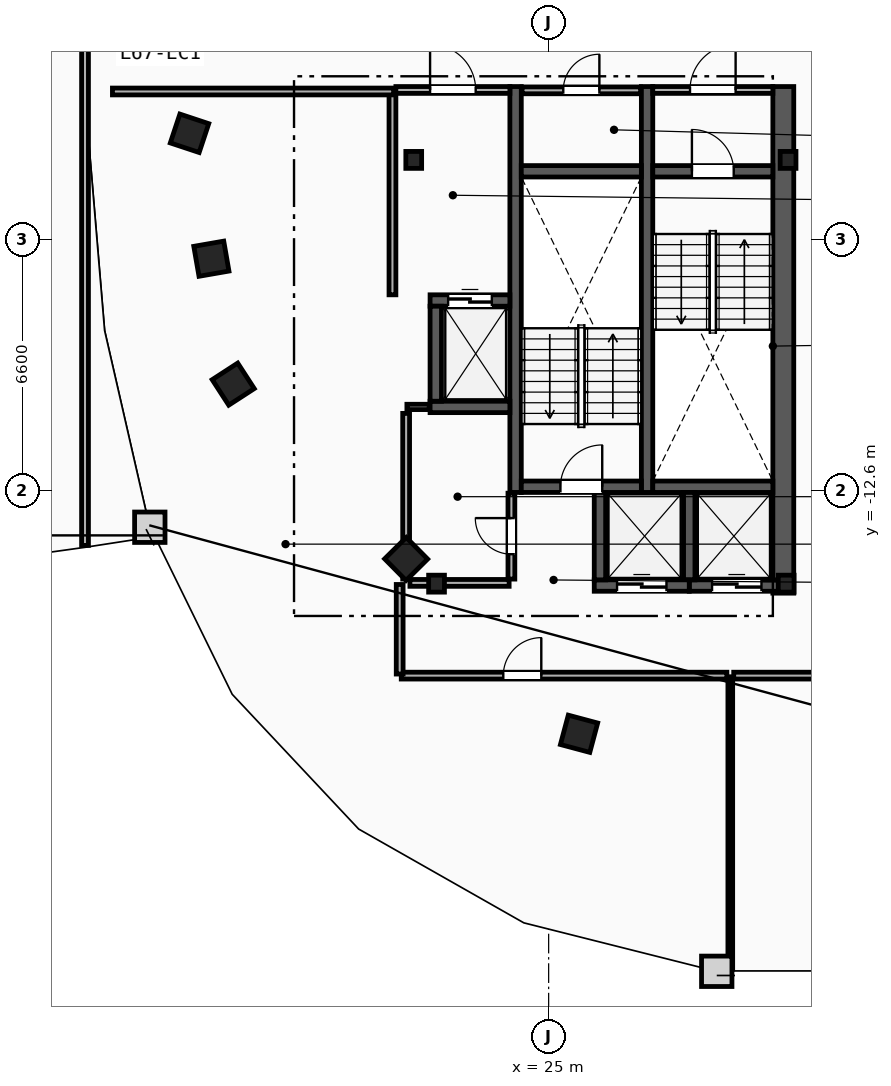
"""IFC4 building model, lengths in metres.
Left out: names, types, materials, properties, quantities, classifications, styles, units other than length and angle.
Written with IfcOpenShell. Run it as: python <this file> out.ifc"""

import sys

from ifc_helpers import new_model, si_unit, direction, frame, frame_2d, origin, origin_2d, place, context, subcontext, project, spatial, rectangle, i_section, extrude, element, fill, save


model = new_model("IFC4")
c1 = context("Model", 3, precision=1e-05, world=origin(), true_north=direction((0.0, 1.0)))
c2 = subcontext(c1, "Body", "Model", "MODEL_VIEW")
j1 = project(units=[si_unit("LENGTHUNIT", "METRE"), si_unit("PLANEANGLEUNIT", "RADIAN")], contexts=[c1])
p1 = place(None, origin())
s1 = spatial("IfcSite", under=j1, at=p1, CompositionType="ELEMENT")
p2 = place(p1, origin())
s2 = spatial("IfcBuilding", under=s1, at=p2, CompositionType="ELEMENT")
p3 = place(p2, frame((0.0, 0.0, 254.0)))
s3 = spatial("IfcBuildingStorey", under=s2, at=p3, CompositionType="ELEMENT", Elevation=254.0)
for number, where, z_axis, x_axis in (
    (1, (31.3, -3.9, 0.0), (0.0, 0.0, 1.0), (1.0, 0.0, 0.0)),
    (2, (21.45, -3.9, 0.0), (0.0, 0.0, 1.0), (1.0, 0.0, 0.0)),
    (3, (22.05, -15.05, 0.0), (0.0, 0.0, 1.0), (1.0, 0.0, 0.0)),
    (4, (31.25, -15.05, 0.0), (0.0, 0.0, 1.0), (1.0, 0.0, 0.0)),
):
    element("IfcColumn", number, at=place(p3, frame(where, z_axis=z_axis, x_axis=x_axis)), inside=s3, PredefinedType="COLUMN", context=c2, shape_type="SweptSolid", body=[
        extrude(i_section(OverallWidth=0.416, OverallDepth=0.446, WebThickness=0.039, FlangeThickness=0.063, FilletRadius=0.018, at=origin_2d()), origin(), (0.0, 0.0, 1.0), 3.6),
    ])
for number, where, z_axis, x_axis in (
    (5, (15.55, -3.2, 0.0), (0.0, 0.0, 1.0), (-0.315, -0.949, 0.0)),
    (6, (16.125, -6.5, 0.0), (0.0, 0.0, 1.0), (0.172, -0.985, 0.0)),
    (7, (16.7, -9.8, 0.0), (0.0, 0.0, 1.0), (0.544, -0.839, 0.0)),
    (8, (21.25, -14.4, 0.0), (0.0, 0.0, 1.0), (0.703, -0.711, 0.0)),
    (9, (25.8, -19.0, 0.0), (0.0, 0.0, 1.0), (0.966, -0.259, 0.0)),
):
    element("IfcColumn", number, at=place(p3, frame(where, z_axis=z_axis, x_axis=x_axis)), inside=s3, PredefinedType="COLUMN", context=c2, shape_type="SweptSolid", body=[
        extrude(rectangle(XDim=0.8, YDim=0.8, at=origin_2d()), origin(), (0.0, 0.0, 1.0), 3.6),
    ])
p4 = place(p3, frame((31.175, -15.3, 0.0), z_axis=(0.0, 0.0, 1.0), x_axis=(0.0, 1.0, 0.0)))
e10 = element("IfcWall", 10, at=p4, inside=s3, PredefinedType="SHEAR", context=c2, shape_type="SweptSolid", body=[
    extrude(rectangle(XDim=13.33, YDim=0.55, at=frame_2d((6.665, 0.0))), origin(), (0.0, 0.0, 1.0), 3.34),
])
for number, where, z_axis, x_axis in (
    (11, (27.59, -12.65, 0.0), (0.0, 0.0, 1.0), (0.0, 1.0, 0.0)),
    (12, (24.13, -12.65, 0.0), (0.0, 0.0, 1.0), (0.0, 1.0, 0.0)),
):
    element("IfcWall", number, at=place(p3, frame(where, z_axis=z_axis, x_axis=x_axis)), inside=s3, PredefinedType="SHEAR", context=c2, shape_type="SweptSolid", body=[
        extrude(rectangle(XDim=10.68, YDim=0.3, at=frame_2d((5.34, 0.0))), origin(), (0.0, 0.0, 1.0), 3.34),
    ])
p5 = place(p3, frame((27.74, -4.2, 0.0), z_axis=(0.0, 0.0, 1.0), x_axis=(1.0, 0.0, 0.0)))
e13 = element("IfcWall", 13, at=p5, inside=s3, PredefinedType="SHEAR", context=c2, shape_type="SweptSolid", body=[
    extrude(rectangle(XDim=3.16, YDim=0.3, at=frame_2d((1.58, 0.0))), origin(), (0.0, 0.0, 1.0), 3.34),
])
p6 = place(p5, frame((1.03, 0.0, 0.0)))
e14 = element("IfcOpeningElement", 14, at=p6, cuts=e13, PredefinedType="OPENING", context=c2, shape_type="SweptSolid", body=[
    extrude(rectangle(XDim=1.1, YDim=2.15, at=frame_2d((0.55, 1.075))), frame((0.0, 0.16, 0.0), z_axis=(0.0, -1.0, 0.0), x_axis=(1.0, 0.0, 0.0)), (0.0, 0.0, 1.0), 0.32),
])
p7 = place(p3, frame((27.74, -12.5, 0.0), z_axis=(0.0, 0.0, 1.0), x_axis=(1.0, 0.0, 0.0)))
e15 = element("IfcWall", 15, at=p7, inside=s3, PredefinedType="SHEAR", context=c2, shape_type="SweptSolid", body=[
    extrude(rectangle(XDim=3.16, YDim=0.3, at=frame_2d((1.58, 0.0))), origin(), (0.0, 0.0, 1.0), 3.34),
])
p8 = place(p3, frame((24.28, -12.5, 0.0), z_axis=(0.0, 0.0, 1.0), x_axis=(1.0, 0.0, 0.0)))
e16 = element("IfcWall", 16, at=p8, inside=s3, PredefinedType="SHEAR", context=c2, shape_type="SweptSolid", body=[
    extrude(rectangle(XDim=3.16, YDim=0.3, at=frame_2d((1.58, 0.0))), origin(), (0.0, 0.0, 1.0), 3.34),
])
p9 = place(p8, frame((1.03, 0.0, 0.0)))
e17 = element("IfcOpeningElement", 17, at=p9, cuts=e16, PredefinedType="OPENING", context=c2, shape_type="SweptSolid", body=[
    extrude(rectangle(XDim=1.1, YDim=2.15, at=frame_2d((0.55, 1.075))), frame((0.0, 0.16, 0.0), z_axis=(0.0, -1.0, 0.0), x_axis=(1.0, 0.0, 0.0)), (0.0, 0.0, 1.0), 0.32),
])
p10 = place(p3, frame((24.28, -4.2, 0.0), z_axis=(0.0, 0.0, 1.0), x_axis=(1.0, 0.0, 0.0)))
e18 = element("IfcWall", 18, at=p10, inside=s3, PredefinedType="SHEAR", context=c2, shape_type="SweptSolid", body=[
    extrude(rectangle(XDim=3.16, YDim=0.3, at=frame_2d((1.58, 0.0))), origin(), (0.0, 0.0, 1.0), 3.34),
])
p11 = place(p3, frame((20.89, -7.45, 0.0), z_axis=(0.0, 0.0, 1.0), x_axis=(0.0, 1.0, 0.0)))
e19 = element("IfcWall", 19, at=p11, inside=s3, PredefinedType="PARTITIONING", context=c2, shape_type="SweptSolid", body=[
    extrude(rectangle(XDim=5.3, YDim=0.18, at=frame_2d((2.65, 0.0))), origin(), (0.0, 0.0, 1.0), 3.34),
])
p12 = place(p3, frame((20.98, -2.06, 0.0), z_axis=(0.0, 0.0, 1.0), x_axis=(1.0, 0.0, 0.0)))
e20 = element("IfcWall", 20, at=p12, inside=s3, PredefinedType="PARTITIONING", context=c2, shape_type="SweptSolid", body=[
    extrude(rectangle(XDim=3.0, YDim=0.18, at=frame_2d((1.5, 0.0))), origin(), (0.0, 0.0, 1.0), 3.34),
])
p13 = place(p12, frame((0.9, 0.0, 0.0)))
e21 = element("IfcOpeningElement", 21, at=p13, cuts=e20, PredefinedType="OPENING", context=c2, shape_type="SweptSolid", body=[
    extrude(rectangle(XDim=1.2, YDim=2.15, at=frame_2d((0.6, 1.075))), frame((0.0, 0.1, 0.0), z_axis=(0.0, -1.0, 0.0), x_axis=(1.0, 0.0, 0.0)), (0.0, 0.0, 1.0), 0.2),
])
p14 = place(p3, frame((27.74, -2.06, 0.0), z_axis=(0.0, 0.0, 1.0), x_axis=(1.0, 0.0, 0.0)))
e22 = element("IfcWall", 22, at=p14, inside=s3, PredefinedType="PARTITIONING", context=c2, shape_type="SweptSolid", body=[
    extrude(rectangle(XDim=3.16, YDim=0.18, at=frame_2d((1.58, 0.0))), origin(), (0.0, 0.0, 1.0), 3.34),
])
p15 = place(p14, frame((0.98, 0.0, 0.0)))
e23 = element("IfcOpeningElement", 23, at=p15, cuts=e22, PredefinedType="OPENING", context=c2, shape_type="SweptSolid", body=[
    extrude(rectangle(XDim=1.2, YDim=2.15, at=frame_2d((0.6, 1.075))), frame((0.0, 0.1, 0.0), z_axis=(0.0, -1.0, 0.0), x_axis=(1.0, 0.0, 0.0)), (0.0, 0.0, 1.0), 0.2),
])
p16 = place(p3, frame((21.88, -7.6, 0.0), z_axis=(0.0, 0.0, 1.0), x_axis=(1.0, 0.0, 0.0)))
e24 = element("IfcWall", 24, at=p16, inside=s3, PredefinedType="SHEAR", context=c2, shape_type="SweptSolid", body=[
    extrude(rectangle(XDim=2.1, YDim=0.3, at=frame_2d((1.05, 0.0))), origin(), (0.0, 0.0, 1.0), 3.34),
])
p17 = place(p16, frame((0.475, 0.0, 0.0)))
e25 = element("IfcOpeningElement", 25, at=p17, cuts=e24, PredefinedType="OPENING", context=c2, shape_type="SweptSolid", body=[
    extrude(rectangle(XDim=1.15, YDim=2.2, at=frame_2d((0.575, 1.1))), frame((0.0, 0.16, 0.0), z_axis=(0.0, -1.0, 0.0), x_axis=(1.0, 0.0, 0.0)), (0.0, 0.0, 1.0), 0.32),
])
p18 = place(p3, frame((21.88, -10.4, 0.0), z_axis=(0.0, 0.0, 1.0), x_axis=(1.0, 0.0, 0.0)))
e26 = element("IfcWall", 26, at=p18, inside=s3, PredefinedType="SHEAR", context=c2, shape_type="SweptSolid", body=[
    extrude(rectangle(XDim=2.1, YDim=0.3, at=frame_2d((1.05, 0.0))), origin(), (0.0, 0.0, 1.0), 3.34),
])
p19 = place(p3, frame((22.03, -10.25, 0.0), z_axis=(0.0, 0.0, 1.0), x_axis=(0.0, 1.0, 0.0)))
e27 = element("IfcWall", 27, at=p19, inside=s3, PredefinedType="SHEAR", context=c2, shape_type="SweptSolid", body=[
    extrude(rectangle(XDim=2.5, YDim=0.3, at=frame_2d((1.25, 0.0))), origin(), (0.0, 0.0, 1.0), 3.34),
])
p20 = place(p3, frame((28.7, -15.1, 0.0), z_axis=(0.0, 0.0, 1.0), x_axis=(1.0, 0.0, 0.0)))
e28 = element("IfcWall", 28, at=p20, inside=s3, PredefinedType="SHEAR", context=c2, shape_type="SweptSolid", body=[
    extrude(rectangle(XDim=2.5, YDim=0.3, at=frame_2d((1.25, 0.0))), origin(), (0.0, 0.0, 1.0), 3.34),
])
p21 = place(p20, frame((0.6, 0.0, 0.0)))
e29 = element("IfcOpeningElement", 29, at=p21, cuts=e28, PredefinedType="OPENING", context=c2, shape_type="SweptSolid", body=[
    extrude(rectangle(XDim=1.3, YDim=2.2, at=frame_2d((0.65, 1.1))), frame((0.0, 0.16, 0.0), z_axis=(0.0, -1.0, 0.0), x_axis=(1.0, 0.0, 0.0)), (0.0, 0.0, 1.0), 0.32),
])
p22 = place(p3, frame((28.7, -14.95, 0.0), z_axis=(0.0, 0.0, 1.0), x_axis=(0.0, 1.0, 0.0)))
e30 = element("IfcWall", 30, at=p22, inside=s3, PredefinedType="SHEAR", context=c2, shape_type="SweptSolid", body=[
    extrude(rectangle(XDim=2.3, YDim=0.3, at=frame_2d((1.15, 0.0))), origin(), (0.0, 0.0, 1.0), 3.34),
])
p23 = place(p3, frame((26.2, -15.1, 0.0), z_axis=(0.0, 0.0, 1.0), x_axis=(1.0, 0.0, 0.0)))
e31 = element("IfcWall", 31, at=p23, inside=s3, PredefinedType="SHEAR", context=c2, shape_type="SweptSolid", body=[
    extrude(rectangle(XDim=2.5, YDim=0.3, at=frame_2d((1.25, 0.0))), origin(), (0.0, 0.0, 1.0), 3.34),
])
p24 = place(p23, frame((0.6, 0.0, 0.0)))
e32 = element("IfcOpeningElement", 32, at=p24, cuts=e31, PredefinedType="OPENING", context=c2, shape_type="SweptSolid", body=[
    extrude(rectangle(XDim=1.3, YDim=2.2, at=frame_2d((0.65, 1.1))), frame((0.0, 0.16, 0.0), z_axis=(0.0, -1.0, 0.0), x_axis=(1.0, 0.0, 0.0)), (0.0, 0.0, 1.0), 0.32),
])
p25 = place(p3, frame((26.35, -14.95, 0.0), z_axis=(0.0, 0.0, 1.0), x_axis=(0.0, 1.0, 0.0)))
e33 = element("IfcWall", 33, at=p25, inside=s3, PredefinedType="SHEAR", context=c2, shape_type="SweptSolid", body=[
    extrude(rectangle(XDim=2.3, YDim=0.3, at=frame_2d((1.15, 0.0))), origin(), (0.0, 0.0, 1.0), 3.34),
])
p26 = place(p3, frame((21.27, -10.4, 0.0), z_axis=(0.0, 0.0, 1.0), x_axis=(1.0, 0.0, 0.0)))
e34 = element("IfcWall", 34, at=p26, inside=s3, PredefinedType="PARTITIONING", context=c2, shape_type="SweptSolid", body=[
    extrude(rectangle(XDim=0.59, YDim=0.14, at=frame_2d((0.295, 0.0))), origin(), (0.0, 0.0, 1.0), 3.34),
])
p27 = place(p3, frame((21.25, -14.93, 0.0), z_axis=(0.0, 0.0, 1.0), x_axis=(0.0, 1.0, 0.0)))
e35 = element("IfcWall", 35, at=p27, inside=s3, PredefinedType="PARTITIONING", context=c2, shape_type="SweptSolid", body=[
    extrude(rectangle(XDim=4.36, YDim=0.18, at=frame_2d((2.18, 0.0))), origin(), (0.0, 0.0, 1.0), 3.34),
])
p28 = place(p3, frame((21.35, -15.03, 0.0), z_axis=(0.0, 0.0, 1.0), x_axis=(1.0, 0.0, 0.0)))
e36 = element("IfcWall", 36, at=p28, inside=s3, PredefinedType="PARTITIONING", context=c2, shape_type="SweptSolid", body=[
    extrude(rectangle(XDim=2.61, YDim=0.18, at=frame_2d((1.305, 0.0))), origin(), (0.0, 0.0, 1.0), 2.413),
])
p29 = place(p3, frame((24.3, -2.07, 0.0), z_axis=(0.0, 0.0, 1.0), x_axis=(1.0, 0.0, 0.0)))
e37 = element("IfcWall", 37, at=p29, inside=s3, PredefinedType="PARTITIONING", context=c2, shape_type="SweptSolid", body=[
    extrude(rectangle(XDim=3.12, YDim=0.18, at=frame_2d((1.56, 0.0))), origin(), (0.0, 0.0, 1.0), 3.34),
])
p30 = place(p29, frame((1.085, 0.0, 0.0)))
e38 = element("IfcOpeningElement", 38, at=p30, cuts=e37, PredefinedType="OPENING", context=c2, shape_type="SweptSolid", body=[
    extrude(rectangle(XDim=0.95, YDim=2.1, at=frame_2d((0.475, 1.05))), frame((0.0, 0.1, 0.0), z_axis=(0.0, -1.0, 0.0), x_axis=(1.0, 0.0, 0.0)), (0.0, 0.0, 1.0), 0.2),
])
p31 = place(p3, frame((24.02, -14.93, 0.0), z_axis=(0.0, 0.0, 1.0), x_axis=(0.0, 1.0, 0.0)))
e39 = element("IfcWall", 39, at=p31, inside=s3, PredefinedType="PARTITIONING", context=c2, shape_type="SweptSolid", body=[
    extrude(rectangle(XDim=2.26, YDim=0.18, at=frame_2d((1.13, 0.0))), origin(), (0.0, 0.0, 1.0), 3.34),
])
p32 = place(p31, frame((0.655, 0.0, 0.0)))
e40 = element("IfcOpeningElement", 40, at=p32, cuts=e39, PredefinedType="OPENING", context=c2, shape_type="SweptSolid", body=[
    extrude(rectangle(XDim=0.95, YDim=2.1, at=frame_2d((0.475, 1.05))), frame((0.0, 0.1, 0.0), z_axis=(0.0, -1.0, 0.0), x_axis=(1.0, 0.0, 0.0)), (0.0, 0.0, 1.0), 0.2),
])
p33 = place(p3, frame((29.78, -25.19, 0.0), z_axis=(0.0, 0.0, 1.0), x_axis=(0.0, 1.0, 0.0)))
e41 = element("IfcWall", 41, at=p33, inside=s3, PredefinedType="PARTITIONING", context=c2, shape_type="SweptSolid", body=[
    extrude(rectangle(XDim=7.69, YDim=0.125, at=frame_2d((3.845, 0.0))), origin(), (0.0, 0.0, 1.0), 3.34),
])
p34 = place(p3, frame((29.87, -17.47, 0.0), z_axis=(0.0, 0.0, 1.0), x_axis=(1.0, 0.0, 0.0)))
e42 = element("IfcWall", 42, at=p34, inside=s3, PredefinedType="PARTITIONING", context=c2, shape_type="SweptSolid", body=[
    extrude(rectangle(XDim=3.758, YDim=0.18, at=frame_2d((1.879, 0.0))), origin(), (0.0, 0.0, 1.0), 3.34),
])
p35 = place(p3, frame((21.122, -17.47, 0.0), z_axis=(0.0, 0.0, 1.0), x_axis=(1.0, 0.0, 0.0)))
e43 = element("IfcWall", 43, at=p35, inside=s3, PredefinedType="PARTITIONING", context=c2, shape_type="SweptSolid", body=[
    extrude(rectangle(XDim=8.568, YDim=0.18, at=frame_2d((4.284, 0.0))), origin(), (0.0, 0.0, 1.0), 3.34),
])
p36 = place(p35, frame((2.685, 0.0, 0.0)))
e44 = element("IfcOpeningElement", 44, at=p36, cuts=e43, PredefinedType="OPENING", context=c2, shape_type="SweptSolid", body=[
    extrude(rectangle(XDim=1.0, YDim=2.15, at=frame_2d((0.5, 1.075))), frame((0.0, 0.1, 0.0), z_axis=(0.0, -1.0, 0.0), x_axis=(1.0, 0.0, 0.0)), (0.0, 0.0, 1.0), 0.2),
])
p37 = place(p3, frame((13.521, -2.1, 0.0), z_axis=(0.0, 0.0, 1.0), x_axis=(1.0, 0.0, 0.0)))
e45 = element("IfcWall", 45, at=p37, inside=s3, PredefinedType="PARTITIONING", context=c2, shape_type="SweptSolid", body=[
    extrude(rectangle(XDim=7.398, YDim=0.18, at=frame_2d((3.699, 0.0))), origin(), (0.0, 0.0, 1.0), 3.34),
])
p38 = place(p3, frame((21.08, -15.072, 0.0), z_axis=(0.0, 0.0, 1.0), x_axis=(0.0, -1.0, 0.0)))
e46 = element("IfcWall", 46, at=p38, inside=s3, PredefinedType="PARTITIONING", context=c2, shape_type="SweptSolid", body=[
    extrude(rectangle(XDim=2.357, YDim=0.18, at=frame_2d((1.178, 0.0))), origin(), (0.0, 0.0, 1.0), 3.34),
])
p39 = place(p3, frame((12.8, -14.044, 0.0), z_axis=(0.0, 0.0, 1.0), x_axis=(0.0, 1.0, 0.0)))
e47 = element("IfcWall", 47, at=p39, inside=s3, PredefinedType="PARTITIONING", context=c2, shape_type="SweptSolid", body=[
    extrude(rectangle(XDim=15.204, YDim=0.18, at=frame_2d((7.602, 0.0))), origin(), (0.0, 0.0, 1.0), 3.34),
])
p40 = place(p6, origin())
e48 = element("IfcDoor", 48, at=p40, inside=s3, OperationType="SINGLE_SWING_LEFT", PredefinedType="DOOR", context=c2, shape_type="SweptSolid", body=[
    extrude(rectangle(XDim=1.1, YDim=2.15, at=frame_2d((0.55, 1.075))), frame((0.0, 0.025, 0.0), z_axis=(0.0, -1.0, 0.0), x_axis=(1.0, 0.0, 0.0)), (0.0, 0.0, 1.0), 0.05),
])
fill(e14, e48)
p41 = place(p9, origin())
e49 = element("IfcDoor", 49, at=p41, inside=s3, OperationType="SINGLE_SWING_RIGHT", PredefinedType="DOOR", context=c2, shape_type="SweptSolid", body=[
    extrude(rectangle(XDim=1.1, YDim=2.15, at=frame_2d((0.55, 1.075))), frame((0.0, 0.025, 0.0), z_axis=(0.0, -1.0, 0.0), x_axis=(1.0, 0.0, 0.0)), (0.0, 0.0, 1.0), 0.05),
])
fill(e17, e49)
p42 = place(p13, origin())
e50 = element("IfcDoor", 50, at=p42, inside=s3, OperationType="SINGLE_SWING_LEFT", PredefinedType="DOOR", context=c2, shape_type="SweptSolid", body=[
    extrude(rectangle(XDim=1.2, YDim=2.15, at=frame_2d((0.6, 1.075))), frame((0.0, 0.025, 0.0), z_axis=(0.0, -1.0, 0.0), x_axis=(1.0, 0.0, 0.0)), (0.0, 0.0, 1.0), 0.05),
])
fill(e21, e50)
p43 = place(p15, origin())
e51 = element("IfcDoor", 51, at=p43, inside=s3, OperationType="SINGLE_SWING_RIGHT", PredefinedType="DOOR", context=c2, shape_type="SweptSolid", body=[
    extrude(rectangle(XDim=1.2, YDim=2.15, at=frame_2d((0.6, 1.075))), frame((0.0, 0.025, 0.0), z_axis=(0.0, -1.0, 0.0), x_axis=(1.0, 0.0, 0.0)), (0.0, 0.0, 1.0), 0.05),
])
fill(e23, e51)
p44 = place(p17, origin())
e52 = element("IfcDoor", 52, at=p44, inside=s3, OperationType="SLIDING_TO_LEFT", PredefinedType="TRAPDOOR", context=c2, shape_type="SweptSolid", body=[
    extrude(rectangle(XDim=1.15, YDim=2.2, at=frame_2d((0.575, 1.1))), frame((0.0, 0.025, 0.0), z_axis=(0.0, -1.0, 0.0), x_axis=(1.0, 0.0, 0.0)), (0.0, 0.0, 1.0), 0.05),
])
fill(e25, e52)
p45 = place(p21, origin())
e53 = element("IfcDoor", 53, at=p45, inside=s3, OperationType="SLIDING_TO_LEFT", PredefinedType="TRAPDOOR", context=c2, shape_type="SweptSolid", body=[
    extrude(rectangle(XDim=1.3, YDim=2.2, at=frame_2d((0.65, 1.1))), frame((0.0, 0.025, 0.0), z_axis=(0.0, -1.0, 0.0), x_axis=(1.0, 0.0, 0.0)), (0.0, 0.0, 1.0), 0.05),
])
fill(e29, e53)
p46 = place(p24, origin())
e54 = element("IfcDoor", 54, at=p46, inside=s3, OperationType="SLIDING_TO_LEFT", PredefinedType="TRAPDOOR", context=c2, shape_type="SweptSolid", body=[
    extrude(rectangle(XDim=1.3, YDim=2.2, at=frame_2d((0.65, 1.1))), frame((0.0, 0.025, 0.0), z_axis=(0.0, -1.0, 0.0), x_axis=(1.0, 0.0, 0.0)), (0.0, 0.0, 1.0), 0.05),
])
fill(e32, e54)
p47 = place(p36, origin())
e55 = element("IfcDoor", 55, at=p47, inside=s3, OperationType="SINGLE_SWING_RIGHT", PredefinedType="DOOR", context=c2, shape_type="SweptSolid", body=[
    extrude(rectangle(XDim=1.0, YDim=2.15, at=frame_2d((0.5, 1.075))), frame((0.0, 0.025, 0.0), z_axis=(0.0, -1.0, 0.0), x_axis=(1.0, 0.0, 0.0)), (0.0, 0.0, 1.0), 0.05),
])
fill(e44, e55)
p48 = place(p30, origin())
e56 = element("IfcDoor", 56, at=p48, inside=s3, OperationType="SINGLE_SWING_RIGHT", PredefinedType="DOOR", context=c2, shape_type="SweptSolid", body=[
    extrude(rectangle(XDim=0.95, YDim=2.1, at=frame_2d((0.475, 1.05))), frame((0.0, 0.025, 0.0), z_axis=(0.0, -1.0, 0.0), x_axis=(1.0, 0.0, 0.0)), (0.0, 0.0, 1.0), 0.05),
])
fill(e38, e56)
p49 = place(p32, origin())
e57 = element("IfcDoor", 57, at=p49, inside=s3, OperationType="SINGLE_SWING_RIGHT", PredefinedType="DOOR", context=c2, shape_type="SweptSolid", body=[
    extrude(rectangle(XDim=0.95, YDim=2.1, at=frame_2d((0.475, 1.05))), frame((0.0, 0.025, 0.0), z_axis=(0.0, -1.0, 0.0), x_axis=(1.0, 0.0, 0.0)), (0.0, 0.0, 1.0), 0.05),
])
fill(e40, e57)
save(model, sys.argv[1])
